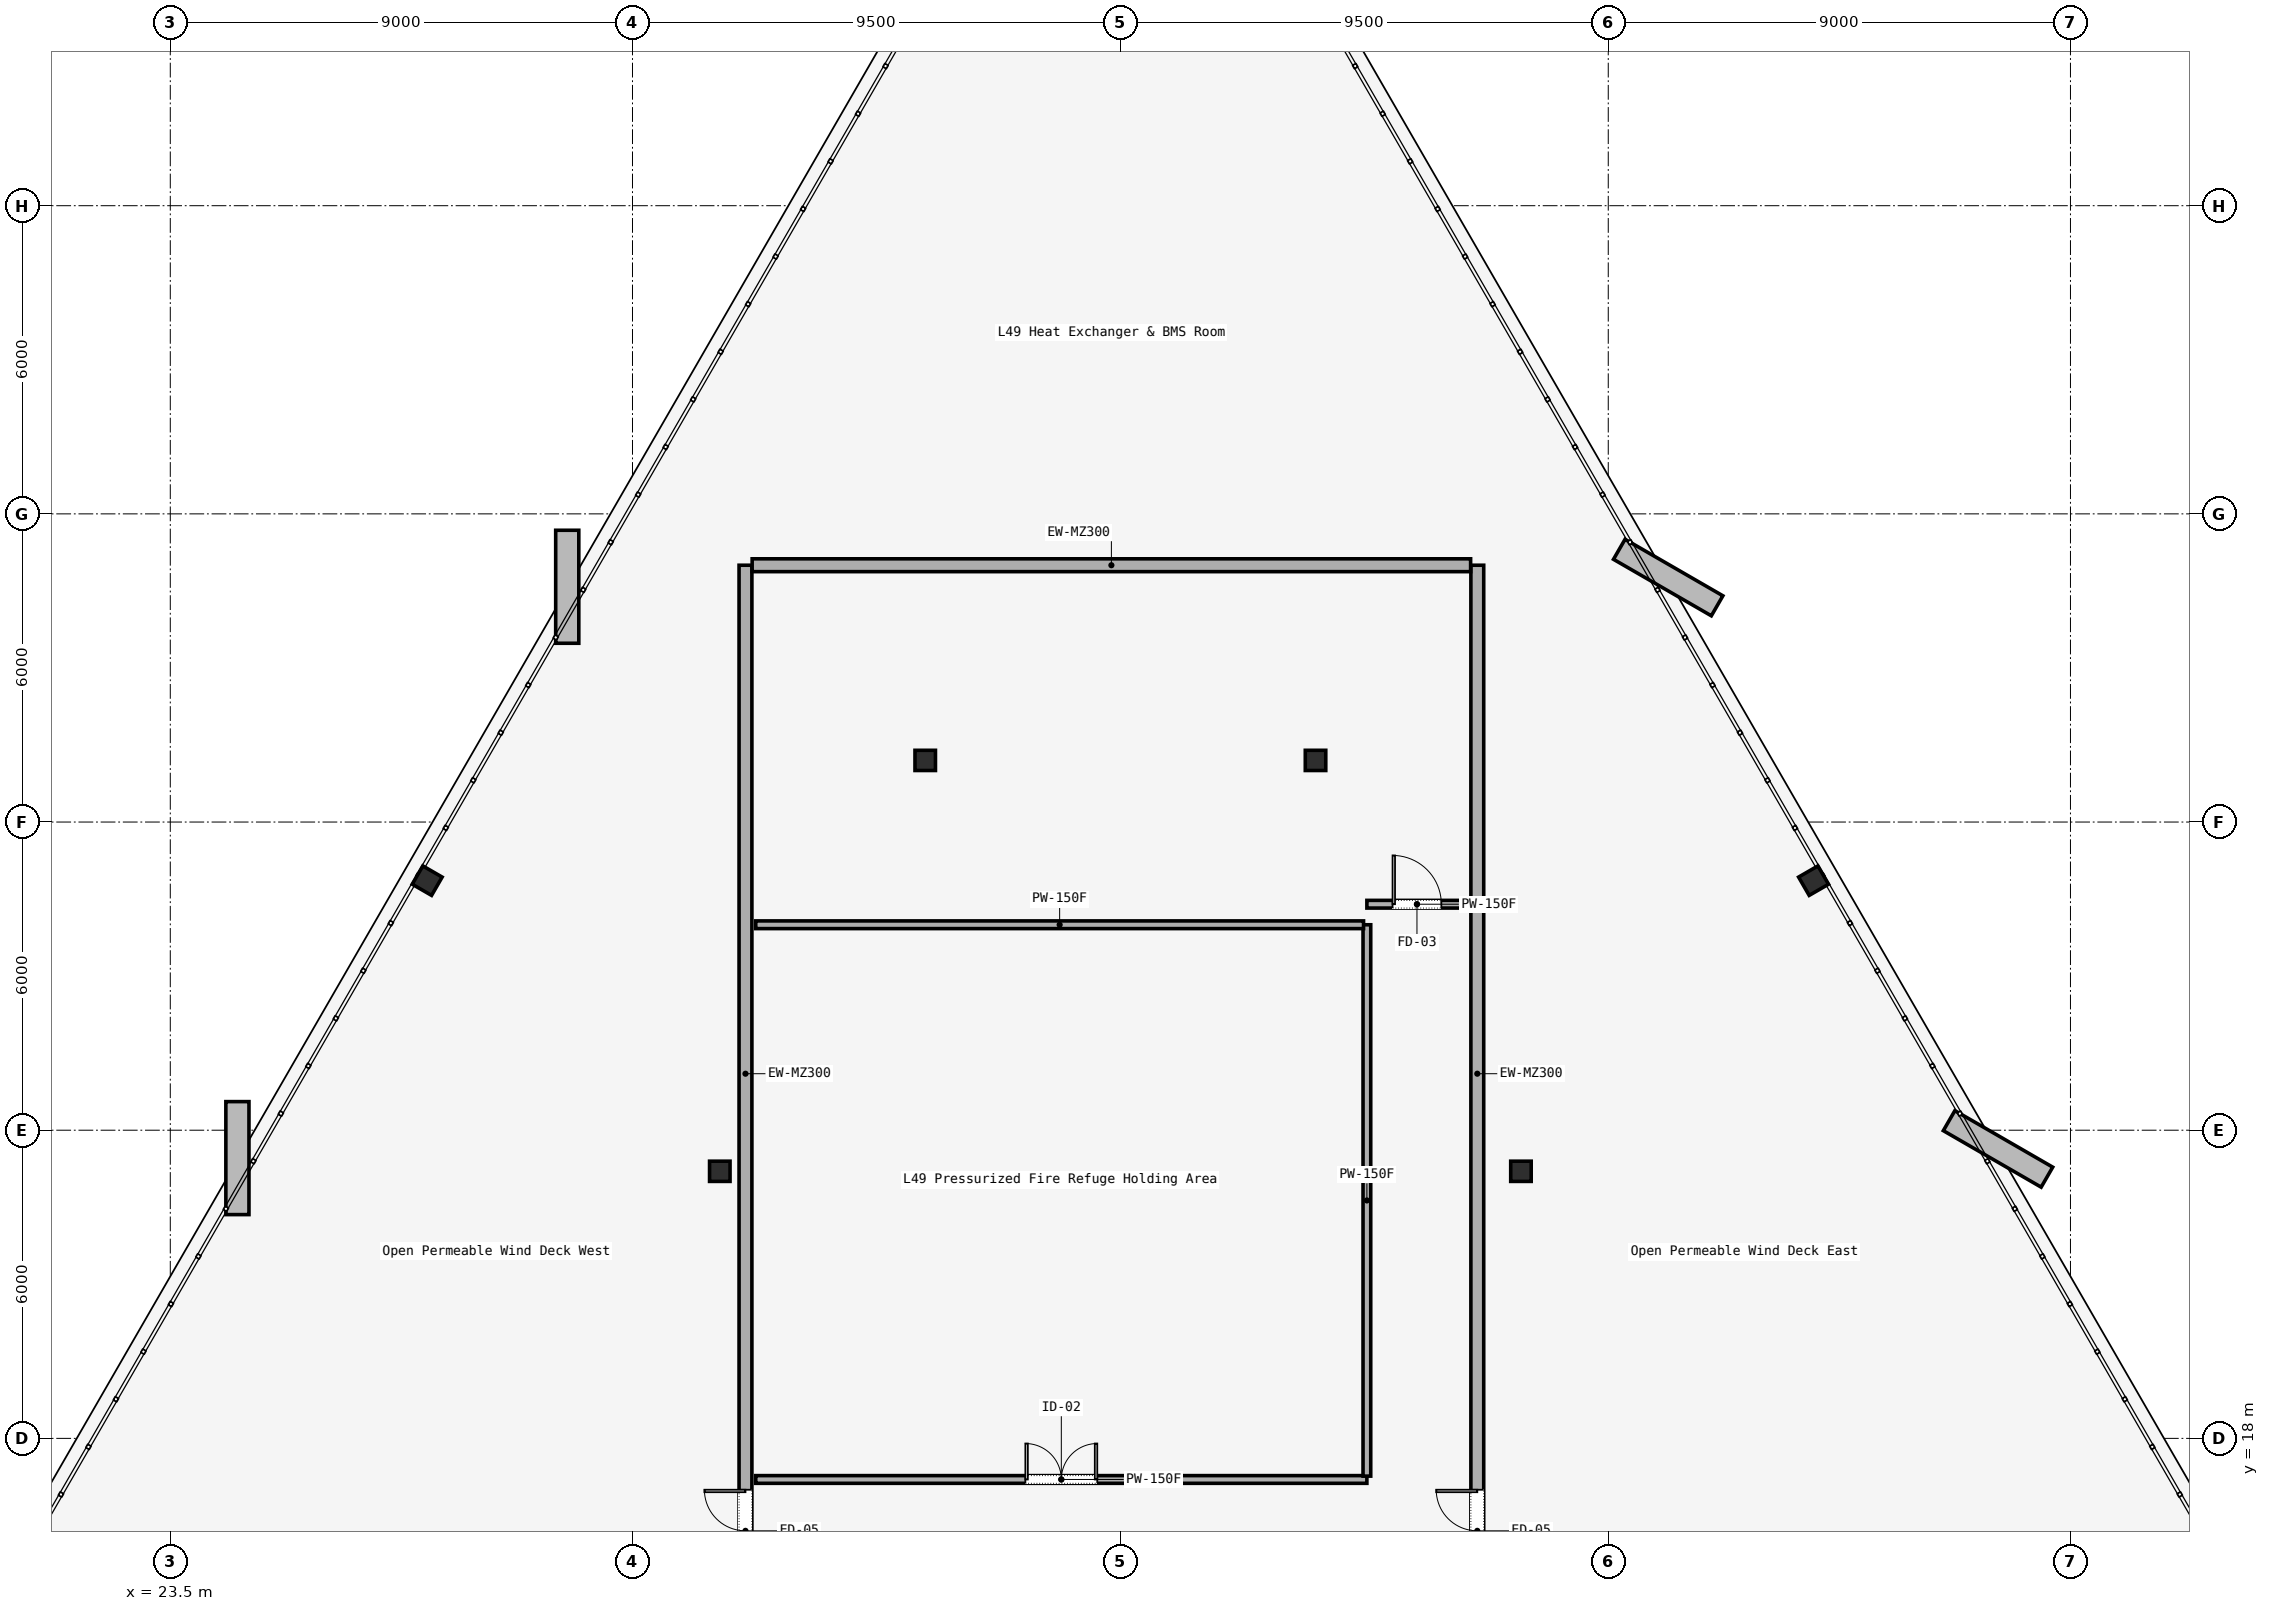
"""IFC4 building model, lengths in metres.
Left out: names, types, materials, properties, quantities, classifications, styles, units other than length and angle.
Written with IfcOpenShell. Run it as: python <this file> out.ifc"""

import sys

from ifc_helpers import new_model, si_unit, direction, frame, frame_2d, origin, origin_2d, place, context, subcontext, project, spatial, rectangle, i_section, extrude, element, fill, save


model = new_model("IFC4")
c1 = context("Model", 3, precision=1e-05, world=origin(), true_north=direction((0.0, 1.0)))
c2 = subcontext(c1, "Body", "Model", "MODEL_VIEW")
j1 = project(units=[si_unit("LENGTHUNIT", "METRE"), si_unit("PLANEANGLEUNIT", "RADIAN")], contexts=[c1])
p1 = place(None, origin())
s1 = spatial("IfcSite", under=j1, at=p1, CompositionType="ELEMENT")
p2 = place(p1, origin())
s2 = spatial("IfcBuilding", under=s1, at=p2, CompositionType="ELEMENT")
p3 = place(p2, frame((0.0, 0.0, 203.0)))
s3 = spatial("IfcBuildingStorey", under=s2, at=p3, CompositionType="ELEMENT", Elevation=203.0)
for number, where, z_axis, x_axis in (
    (1, (34.2, 23.2, 0.0), (0.0, 0.0, 1.0), (1.0, 0.0, 0.0)),
    (2, (49.8, 23.2, 0.0), (0.0, 0.0, 1.0), (1.0, 0.0, 0.0)),
    (3, (38.2, 31.2, 0.0), (0.0, 0.0, 1.0), (1.0, 0.0, 0.0)),
    (4, (45.8, 31.2, 0.0), (0.0, 0.0, 1.0), (1.0, 0.0, 0.0)),
):
    element("IfcColumn", number, at=place(p3, frame(where, z_axis=z_axis, x_axis=x_axis)), inside=s3, PredefinedType="COLUMN", context=c2, shape_type="SweptSolid", body=[
        extrude(i_section(OverallWidth=0.399, OverallDepth=0.394, WebThickness=0.023, FlangeThickness=0.037, FilletRadius=0.015, at=origin_2d()), origin(), (0.0, 0.0, 1.0), 5.12),
    ])
for number, where, z_axis, x_axis in (
    (5, (55.498, 28.859, 0.0), (0.0, 0.0, 1.0), (-0.5, 0.866, 0.0)),
    (6, (28.502, 28.859, 0.0), (0.0, 0.0, 1.0), (0.5, 0.866, 0.0)),
):
    element("IfcColumn", number, at=place(p3, frame(where, z_axis=z_axis, x_axis=x_axis)), inside=s3, PredefinedType="COLUMN", context=c2, shape_type="SweptSolid", body=[
        extrude(i_section(OverallWidth=0.412, OverallDepth=0.435, WebThickness=0.036, FlangeThickness=0.044, FilletRadius=0.015, at=origin_2d()), origin(), (0.0, 0.0, 1.0), 5.12),
    ])
p4 = place(p3, frame((34.7, 15.2, 0.0), z_axis=(0.0, 0.0, 1.0), x_axis=(0.0, 1.0, 0.0)))
e7 = element("IfcWall", 7, at=p4, inside=s3, PredefinedType="SOLIDWALL", context=c2, shape_type="SweptSolid", body=[
    extrude(rectangle(XDim=19.8, YDim=0.25, at=frame_2d((9.9, 0.0))), origin(), (0.0, 0.0, 1.0), 3.99),
])
p5 = place(p4, frame((0.2, 0.0, 0.0)))
e8 = element("IfcOpeningElement", 8, at=p5, cuts=e7, PredefinedType="OPENING", context=c2, shape_type="SweptSolid", body=[
    extrude(rectangle(XDim=1.6, YDim=2.3, at=frame_2d((0.8, 1.15))), frame((0.0, 0.125, 0.0), z_axis=(0.0, -1.0, 0.0), x_axis=(1.0, 0.0, 0.0)), (0.0, 0.0, 1.0), 0.25),
])
p6 = place(p3, frame((48.95, 15.2, 0.0), z_axis=(0.0, 0.0, 1.0), x_axis=(0.0, 1.0, 0.0)))
e9 = element("IfcWall", 9, at=p6, inside=s3, PredefinedType="SOLIDWALL", context=c2, shape_type="SweptSolid", body=[
    extrude(rectangle(XDim=19.8, YDim=0.25, at=frame_2d((9.9, 0.0))), origin(), (0.0, 0.0, 1.0), 3.99),
])
p7 = place(p6, frame((0.2, 0.0, 0.0)))
e10 = element("IfcOpeningElement", 10, at=p7, cuts=e9, PredefinedType="OPENING", context=c2, shape_type="SweptSolid", body=[
    extrude(rectangle(XDim=1.6, YDim=2.3, at=frame_2d((0.8, 1.15))), frame((0.0, 0.125, 0.0), z_axis=(0.0, -1.0, 0.0), x_axis=(1.0, 0.0, 0.0)), (0.0, 0.0, 1.0), 0.25),
])
p8 = place(p3, frame((34.83, 35.0, 0.0), z_axis=(0.0, 0.0, 1.0), x_axis=(1.0, 0.0, 0.0)))
e11 = element("IfcWall", 11, at=p8, inside=s3, PredefinedType="SOLIDWALL", context=c2, shape_type="SweptSolid", body=[
    extrude(rectangle(XDim=13.99, YDim=0.25, at=frame_2d((6.995, 0.0))), origin(), (0.0, 0.0, 1.0), 3.99),
])
p9 = place(p3, frame((34.9, 17.2, 0.0), z_axis=(0.0, 0.0, 1.0), x_axis=(1.0, 0.0, 0.0)))
e12 = element("IfcWall", 12, at=p9, inside=s3, PredefinedType="PARTITIONING", context=c2, shape_type="SweptSolid", body=[
    extrude(rectangle(XDim=11.9, YDim=0.15, at=frame_2d((5.95, 0.0))), origin(), (0.0, 0.0, 1.0), 3.99),
])
p10 = place(p9, frame((5.25, 0.0, 0.0)))
e13 = element("IfcOpeningElement", 13, at=p10, cuts=e12, PredefinedType="OPENING", context=c2, shape_type="SweptSolid", body=[
    extrude(rectangle(XDim=1.4, YDim=2.2, at=frame_2d((0.7, 1.1))), frame((0.0, 0.075, 0.0), z_axis=(0.0, -1.0, 0.0), x_axis=(1.0, 0.0, 0.0)), (0.0, 0.0, 1.0), 0.15),
])
p11 = place(p3, frame((46.8, 17.265, 0.0), z_axis=(0.0, 0.0, 1.0), x_axis=(0.0, 1.0, 0.0)))
e14 = element("IfcWall", 14, at=p11, inside=s3, PredefinedType="PARTITIONING", context=c2, shape_type="SweptSolid", body=[
    extrude(rectangle(XDim=10.735, YDim=0.15, at=frame_2d((5.368, 0.0))), origin(), (0.0, 0.0, 1.0), 3.99),
])
p12 = place(p3, frame((46.8, 28.4, 0.0), z_axis=(0.0, 0.0, 1.0), x_axis=(1.0, 0.0, 0.0)))
e15 = element("IfcWall", 15, at=p12, inside=s3, PredefinedType="PARTITIONING", context=c2, shape_type="SweptSolid", body=[
    extrude(rectangle(XDim=1.95, YDim=0.15, at=frame_2d((0.975, 0.0))), origin(), (0.0, 0.0, 1.0), 3.99),
])
p13 = place(p12, frame((0.5, 0.0, 0.0)))
e16 = element("IfcOpeningElement", 16, at=p13, cuts=e15, PredefinedType="OPENING", context=c2, shape_type="SweptSolid", body=[
    extrude(rectangle(XDim=0.95, YDim=2.2, at=frame_2d((0.475, 1.1))), frame((0.0, 0.075, 0.0), z_axis=(0.0, -1.0, 0.0), x_axis=(1.0, 0.0, 0.0)), (0.0, 0.0, 1.0), 0.15),
])
p14 = place(p3, frame((34.9, 28.0, 0.0), z_axis=(0.0, 0.0, 1.0), x_axis=(1.0, 0.0, 0.0)))
e17 = element("IfcWall", 17, at=p14, inside=s3, PredefinedType="PARTITIONING", context=c2, shape_type="SweptSolid", body=[
    extrude(rectangle(XDim=11.835, YDim=0.15, at=frame_2d((5.917, 0.0))), origin(), (0.0, 0.0, 1.0), 3.99),
])
p15 = place(p5, origin())
e18 = element("IfcDoor", 18, at=p15, inside=s3, OperationType="DOUBLE_DOOR_SINGLE_SWING", PredefinedType="DOOR", context=c2, shape_type="SweptSolid", body=[
    extrude(rectangle(XDim=1.6, YDim=2.3, at=frame_2d((0.8, 1.15))), frame((0.0, 0.025, 0.0), z_axis=(0.0, -1.0, 0.0), x_axis=(1.0, 0.0, 0.0)), (0.0, 0.0, 1.0), 0.05),
])
fill(e8, e18)
p16 = place(p7, origin())
e19 = element("IfcDoor", 19, at=p16, inside=s3, OperationType="DOUBLE_DOOR_SINGLE_SWING", PredefinedType="DOOR", context=c2, shape_type="SweptSolid", body=[
    extrude(rectangle(XDim=1.6, YDim=2.3, at=frame_2d((0.8, 1.15))), frame((0.0, 0.025, 0.0), z_axis=(0.0, -1.0, 0.0), x_axis=(1.0, 0.0, 0.0)), (0.0, 0.0, 1.0), 0.05),
])
fill(e10, e19)
p17 = place(p10, origin())
e20 = element("IfcDoor", 20, at=p17, inside=s3, OperationType="SINGLE_SWING_RIGHT", PredefinedType="DOOR", context=c2, shape_type="SweptSolid", body=[
    extrude(rectangle(XDim=1.4, YDim=2.2, at=frame_2d((0.7, 1.1))), frame((0.0, 0.025, 0.0), z_axis=(0.0, -1.0, 0.0), x_axis=(1.0, 0.0, 0.0)), (0.0, 0.0, 1.0), 0.05),
])
fill(e13, e20)
p18 = place(p13, origin())
e21 = element("IfcDoor", 21, at=p18, inside=s3, OperationType="SINGLE_SWING_LEFT", PredefinedType="DOOR", context=c2, shape_type="SweptSolid", body=[
    extrude(rectangle(XDim=0.95, YDim=2.2, at=frame_2d((0.475, 1.1))), frame((0.0, 0.025, 0.0), z_axis=(0.0, -1.0, 0.0), x_axis=(1.0, 0.0, 0.0)), (0.0, 0.0, 1.0), 0.05),
])
fill(e16, e21)
save(model, sys.argv[1])
